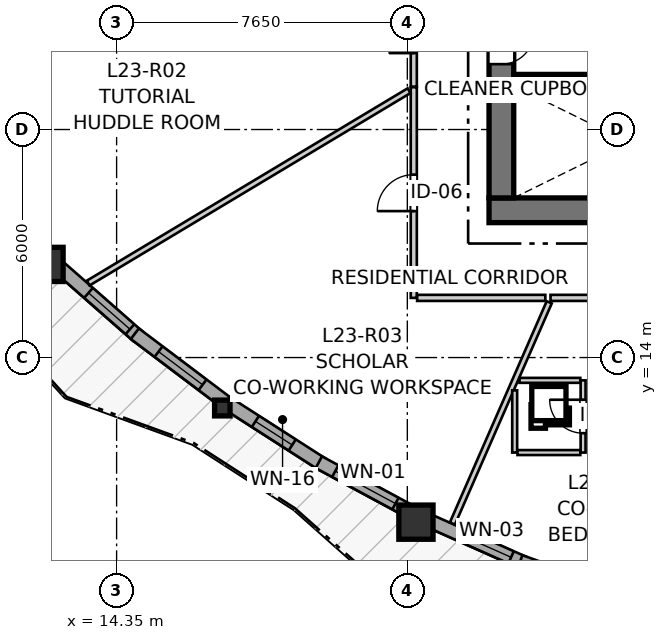
"""IFC4 building model, lengths in metres.
Left out: names, types, materials, properties, quantities, classifications, styles, units other than length and angle.
Written with IfcOpenShell. Run it as: python <this file> out.ifc"""

import sys

from ifc_helpers import new_model, si_unit, direction, frame, frame_2d, origin, origin_2d, place, context, subcontext, project, spatial, rectangle, i_section, extrude, source, transform, mapped, element, fill, save


model = new_model("IFC4")
c1 = context("Model", 3, precision=1e-05, world=origin(), true_north=direction((0.0, 1.0)))
c2 = subcontext(c1, "Body", "Model", "MODEL_VIEW")
j1 = project(units=[si_unit("LENGTHUNIT", "METRE"), si_unit("PLANEANGLEUNIT", "RADIAN")], contexts=[c1])
p1 = place(None, origin())
s1 = spatial("IfcSite", under=j1, at=p1, CompositionType="ELEMENT")
p2 = place(p1, origin())
s2 = spatial("IfcBuilding", under=s1, at=p2, CompositionType="ELEMENT")
p3 = place(p2, frame((0.0, 0.0, 80.0)))
s3 = spatial("IfcBuildingStorey", under=s2, at=p3, CompositionType="ELEMENT", Elevation=80.0)
p4 = place(p3, frame((24.15, 17.875, 0.0), z_axis=(0.0, 0.0, 1.0), x_axis=(1.0, 0.0, 0.0)))
e1 = element("IfcWall", 1, at=p4, inside=s3, PredefinedType="SHEAR", context=c2, shape_type="SweptSolid", body=[
    extrude(rectangle(XDim=12.4, YDim=0.65, at=frame_2d((6.2, 0.0))), origin(), (0.0, 0.0, 1.0), 2.935),
])
p5 = place(p3, frame((24.475, 33.8, 0.0), z_axis=(0.0, 0.0, 1.0), x_axis=(0.0, -1.0, 0.0)))
e2 = element("IfcWall", 2, at=p5, inside=s3, PredefinedType="SHEAR", context=c2, shape_type="SweptSolid", body=[
    extrude(rectangle(XDim=15.6, YDim=0.65, at=frame_2d((7.8, 0.0))), origin(), (0.0, 0.0, 1.0), 2.935),
])
p6 = place(p5, frame((7.05, 0.0, 0.0)))
e3 = element("IfcOpeningElement", 3, at=p6, cuts=e2, PredefinedType="OPENING", context=c2, shape_type="SweptSolid", body=[
    extrude(rectangle(XDim=1.5, YDim=2.15, at=frame_2d((0.75, 1.075))), frame((0.0, 0.335, 0.0), z_axis=(0.0, -1.0, 0.0), x_axis=(1.0, 0.0, 0.0)), (0.0, 0.0, 1.0), 0.67),
])
p7 = place(p5, frame((3.52, 0.0, 0.0)))
e4 = element("IfcOpeningElement", 4, at=p7, cuts=e2, PredefinedType="OPENING", context=c2, shape_type="SweptSolid", body=[
    extrude(rectangle(XDim=0.86, YDim=2.05, at=frame_2d((0.43, 1.025))), frame((0.0, 0.335, 0.0), z_axis=(0.0, -1.0, 0.0), x_axis=(1.0, 0.0, 0.0)), (0.0, 0.0, 1.0), 0.67),
])
p8 = place(p5, frame((11.22, 0.0, 0.0)))
e5 = element("IfcOpeningElement", 5, at=p8, cuts=e2, PredefinedType="OPENING", context=c2, shape_type="SweptSolid", body=[
    extrude(rectangle(XDim=0.86, YDim=2.05, at=frame_2d((0.43, 1.025))), frame((0.0, 0.335, 0.0), z_axis=(0.0, -1.0, 0.0), x_axis=(1.0, 0.0, 0.0)), (0.0, 0.0, 1.0), 0.67),
])
p9 = place(p3, frame((24.8, 21.3, 0.0), z_axis=(0.0, 0.0, 1.0), x_axis=(1.0, 0.0, 0.0)))
e6 = element("IfcWall", 6, at=p9, inside=s3, PredefinedType="SHEAR", context=c2, shape_type="SweptSolid", body=[
    extrude(rectangle(XDim=11.1, YDim=0.3, at=frame_2d((5.55, 0.0))), origin(), (0.0, 0.0, 1.0), 2.935),
])
p10 = place(p9, frame((6.22, 0.0, 0.0)))
e7 = element("IfcOpeningElement", 7, at=p10, cuts=e6, PredefinedType="OPENING", context=c2, shape_type="SweptSolid", body=[
    extrude(rectangle(XDim=0.98, YDim=2.15, at=frame_2d((0.49, 1.075))), frame((0.0, 0.16, 0.0), z_axis=(0.0, -1.0, 0.0), x_axis=(1.0, 0.0, 0.0)), (0.0, 0.0, 1.0), 0.32),
])
p11 = place(p9, frame((9.15, 0.0, 0.0)))
e8 = element("IfcOpeningElement", 8, at=p11, cuts=e6, PredefinedType="OPENING", context=c2, shape_type="SweptSolid", body=[
    extrude(rectangle(XDim=1.15, YDim=2.15, at=frame_2d((0.575, 1.075))), frame((0.0, 0.16, 0.0), z_axis=(0.0, -1.0, 0.0), x_axis=(1.0, 0.0, 0.0)), (0.0, 0.0, 1.0), 0.32),
])
m1 = source(origin(), c2, "Body", "SweptSolid", [
    extrude(rectangle(XDim=0.9, YDim=0.9, at=origin_2d()), origin(), (0.0, 0.0, 1.0), 2.935),
])
p12 = place(p3, frame((12.493, 16.451, 0.0), z_axis=(0.0, 0.0, 1.0), x_axis=(1.0, 0.0, 0.0)))
e9 = element("IfcColumn", 9, at=p12, inside=s3, PredefinedType="COLUMN", context=c2, shape_type="MappedRepresentation", body=[
    mapped(m1, transform((0.0, 0.0, 0.0), x_axis=(1.0, 0.0, 0.0), y_axis=(0.0, 1.0, 0.0), z_axis=(0.0, 0.0, 1.0), scale=1.0)),
])
m2 = source(origin(), c2, "Body", "SweptSolid", [
    extrude(i_section(OverallWidth=0.406, OverallDepth=0.416, WebThickness=0.027, FlangeThickness=0.044, FilletRadius=0.015, at=origin_2d()), origin(), (0.0, 0.0, 1.0), 2.935),
])
p13 = place(p3, frame((17.131, 12.673, 0.0), z_axis=(0.0, 0.0, 1.0), x_axis=(1.0, 0.0, 0.0)))
e10 = element("IfcColumn", 10, at=p13, inside=s3, PredefinedType="PILASTER", context=c2, shape_type="MappedRepresentation", body=[
    mapped(m2, transform((0.0, 0.0, 0.0), x_axis=(1.0, 0.0, 0.0), y_axis=(0.0, 1.0, 0.0), z_axis=(0.0, 0.0, 1.0), scale=1.0)),
])
p14 = place(p3, frame((22.227, 9.669, 0.0), z_axis=(0.0, 0.0, 1.0), x_axis=(1.0, 0.0, 0.0)))
e11 = element("IfcColumn", 11, at=p14, inside=s3, PredefinedType="COLUMN", context=c2, shape_type="MappedRepresentation", body=[
    mapped(m1, transform((0.0, 0.0, 0.0), x_axis=(1.0, 0.0, 0.0), y_axis=(0.0, 1.0, 0.0), z_axis=(0.0, 0.0, 1.0), scale=1.0)),
])
p15 = place(p3, frame((12.777, 16.434, 0.0), z_axis=(0.0, 0.0, 1.0), x_axis=(0.751531192513, -0.659697556976, 0.0)))
e12 = element("IfcWall", 12, at=p15, inside=s3, PredefinedType="SOLIDWALL", context=c2, shape_type="SweptSolid", body=[
    extrude(rectangle(XDim=2.823, YDim=0.35, at=frame_2d((1.412, 0.0))), origin(), (0.0, 0.0, 1.0), 2.465),
])
p16 = place(p15, frame((1.11, 0.0, 0.82)))
e13 = element("IfcOpeningElement", 13, at=p16, cuts=e12, PredefinedType="OPENING", context=c2, shape_type="SweptSolid", body=[
    extrude(rectangle(XDim=1.45, YDim=1.25, at=frame_2d((0.725, 0.625))), frame((0.0, 0.185, 0.0), z_axis=(0.0, -1.0, 0.0), x_axis=(1.0, 0.0, 0.0)), (0.0, 0.0, 1.0), 0.37),
])
p17 = place(p3, frame((14.83, 14.627, 0.0), z_axis=(0.0, 0.0, 1.0), x_axis=(0.798382892471, -0.602150111691, 0.0)))
e14 = element("IfcWall", 14, at=p17, inside=s3, PredefinedType="SOLIDWALL", context=c2, shape_type="SweptSolid", body=[
    extrude(rectangle(XDim=2.995, YDim=0.35, at=frame_2d((1.497, 0.0))), origin(), (0.0, 0.0, 1.0), 2.465),
])
p18 = place(p17, frame((0.782, 0.0, 0.82)))
e15 = element("IfcOpeningElement", 15, at=p18, cuts=e14, PredefinedType="OPENING", context=c2, shape_type="SweptSolid", body=[
    extrude(rectangle(XDim=1.45, YDim=1.25, at=frame_2d((0.725, 0.625))), frame((0.0, 0.185, 0.0), z_axis=(0.0, -1.0, 0.0), x_axis=(1.0, 0.0, 0.0)), (0.0, 0.0, 1.0), 0.37),
])
p19 = place(p3, frame((17.243, 12.809, 0.0), z_axis=(0.0, 0.0, 1.0), x_axis=(0.84150067635, -0.540256061236, 0.0)))
e16 = element("IfcWall", 16, at=p19, inside=s3, PredefinedType="SOLIDWALL", context=c2, shape_type="SweptSolid", body=[
    extrude(rectangle(XDim=2.978, YDim=0.35, at=frame_2d((1.489, 0.0))), origin(), (0.0, 0.0, 1.0), 2.465),
])
p20 = place(p19, frame((0.904, 0.0, 0.82)))
e17 = element("IfcOpeningElement", 17, at=p20, cuts=e16, PredefinedType="OPENING", context=c2, shape_type="SweptSolid", body=[
    extrude(rectangle(XDim=1.15, YDim=1.2, at=frame_2d((0.575, 0.6))), frame((0.0, 0.185, 0.0), z_axis=(0.0, -1.0, 0.0), x_axis=(1.0, 0.0, 0.0)), (0.0, 0.0, 1.0), 0.37),
])
p21 = place(p3, frame((19.671, 11.246, 0.0), z_axis=(0.0, 0.0, 1.0), x_axis=(0.880120285763, -0.474750758387, 0.0)))
e18 = element("IfcWall", 18, at=p21, inside=s3, PredefinedType="SOLIDWALL", context=c2, shape_type="SweptSolid", body=[
    extrude(rectangle(XDim=2.773, YDim=0.35, at=frame_2d((1.386, 0.0))), origin(), (0.0, 0.0, 1.0), 2.465),
])
p22 = place(p21, frame((0.491, 0.0, 0.82)))
e19 = element("IfcOpeningElement", 19, at=p22, cuts=e18, PredefinedType="OPENING", context=c2, shape_type="SweptSolid", body=[
    extrude(rectangle(XDim=1.8, YDim=1.45, at=frame_2d((0.9, 0.725))), frame((0.0, 0.185, 0.0), z_axis=(0.0, -1.0, 0.0), x_axis=(1.0, 0.0, 0.0)), (0.0, 0.0, 1.0), 0.37),
])
p23 = place(p3, frame((22.503, 9.737, 0.0), z_axis=(0.0, 0.0, 1.0), x_axis=(0.913443049169, -0.406966578388, 0.0)))
e20 = element("IfcWall", 20, at=p23, inside=s3, PredefinedType="SOLIDWALL", context=c2, shape_type="SweptSolid", body=[
    extrude(rectangle(XDim=2.79, YDim=0.35, at=frame_2d((1.395, 0.0))), origin(), (0.0, 0.0, 1.0), 2.465),
])
p24 = place(p23, frame((0.938, 0.0, 0.82)))
e21 = element("IfcOpeningElement", 21, at=p24, cuts=e20, PredefinedType="OPENING", context=c2, shape_type="SweptSolid", body=[
    extrude(rectangle(XDim=1.5, YDim=1.45, at=frame_2d((0.75, 0.725))), frame((0.0, 0.185, 0.0), z_axis=(0.0, -1.0, 0.0), x_axis=(1.0, 0.0, 0.0)), (0.0, 0.0, 1.0), 0.37),
])
p25 = place(p3, frame((24.969, 8.635, 0.0), z_axis=(0.0, 0.0, 1.0), x_axis=(0.941099972293, -0.338128440315, 0.0)))
e22 = element("IfcWall", 22, at=p25, inside=s3, PredefinedType="SOLIDWALL", context=c2, shape_type="SweptSolid", body=[
    extrude(rectangle(XDim=3.028, YDim=0.35, at=frame_2d((1.514, 0.0))), origin(), (0.0, 0.0, 1.0), 2.465),
])
p26 = place(p25, frame((0.774, 0.0, 0.82)))
e23 = element("IfcOpeningElement", 23, at=p26, cuts=e22, PredefinedType="OPENING", context=c2, shape_type="SweptSolid", body=[
    extrude(rectangle(XDim=1.5, YDim=1.45, at=frame_2d((0.75, 0.725))), frame((0.0, 0.185, 0.0), z_axis=(0.0, -1.0, 0.0), x_axis=(1.0, 0.0, 0.0)), (0.0, 0.0, 1.0), 0.37),
])
p27 = place(p3, frame((22.17, 15.57, 0.0), z_axis=(0.0, 0.0, 1.0), x_axis=(0.0, 1.0, 0.0)))
e24 = element("IfcWall", 24, at=p27, inside=s3, PredefinedType="PARTITIONING", context=c2, shape_type="SweptSolid", body=[
    extrude(rectangle(XDim=5.543, YDim=0.16, at=frame_2d((2.771, 0.0))), origin(), (0.0, 0.0, 1.0), 2.935),
])
p28 = place(p27, frame((2.283, 0.0, 0.0)))
e25 = element("IfcOpeningElement", 25, at=p28, cuts=e24, PredefinedType="OPENING", context=c2, shape_type="SweptSolid", body=[
    extrude(rectangle(XDim=0.96, YDim=2.1, at=frame_2d((0.48, 1.05))), frame((0.0, 0.09, 0.0), z_axis=(0.0, -1.0, 0.0), x_axis=(1.0, 0.0, 0.0)), (0.0, 0.0, 1.0), 0.18),
])
p29 = place(p3, frame((29.438, 15.57, 0.0), z_axis=(0.0, 0.0, 1.0), x_axis=(-1.0, 0.0, 0.0)))
e26 = element("IfcWall", 26, at=p29, inside=s3, PredefinedType="PARTITIONING", context=c2, shape_type="SweptSolid", body=[
    extrude(rectangle(XDim=3.67, YDim=0.16, at=frame_2d((1.835, 0.0))), origin(), (0.0, 0.0, 1.0), 2.935),
])
p30 = place(p29, frame((1.374, 0.0, 0.0)))
e27 = element("IfcOpeningElement", 27, at=p30, cuts=e26, PredefinedType="OPENING", context=c2, shape_type="SweptSolid", body=[
    extrude(rectangle(XDim=0.92, YDim=2.1, at=frame_2d((0.46, 1.05))), frame((0.0, 0.09, 0.0), z_axis=(0.0, -1.0, 0.0), x_axis=(1.0, 0.0, 0.0)), (0.0, 0.0, 1.0), 0.18),
])
p31 = place(p3, frame((22.17, 21.128, 0.0), z_axis=(0.0, 0.0, 1.0), x_axis=(0.0, 1.0, 0.0)))
e28 = element("IfcWall", 28, at=p31, inside=s3, PredefinedType="PARTITIONING", context=c2, shape_type="SweptSolid", body=[
    extrude(rectangle(XDim=3.022, YDim=0.16, at=frame_2d((1.511, 0.0))), origin(), (0.0, 0.0, 1.0), 2.935),
])
p32 = place(p31, frame((0.883, 0.0, 0.0)))
e29 = element("IfcOpeningElement", 29, at=p32, cuts=e28, PredefinedType="OPENING", context=c2, shape_type="SweptSolid", body=[
    extrude(rectangle(XDim=1.3, YDim=2.1, at=frame_2d((0.65, 1.05))), frame((0.0, 0.09, 0.0), z_axis=(0.0, -1.0, 0.0), x_axis=(1.0, 0.0, 0.0)), (0.0, 0.0, 1.0), 0.18),
])
p33 = place(p3, frame((26.625, 11.5, 0.0), z_axis=(0.0, 0.0, 1.0), x_axis=(0.0, 1.0, 0.0)))
e30 = element("IfcWall", 30, at=p33, inside=s3, PredefinedType="PARTITIONING", context=c2, shape_type="SweptSolid", body=[
    extrude(rectangle(XDim=1.9, YDim=0.13, at=frame_2d((0.95, 0.0))), origin(), (0.0, 0.0, 1.0), 2.935),
])
p34 = place(p33, frame((0.51, 0.0, 0.0)))
e31 = element("IfcOpeningElement", 31, at=p34, cuts=e30, PredefinedType="OPENING", context=c2, shape_type="SweptSolid", body=[
    extrude(rectangle(XDim=0.88, YDim=2.05, at=frame_2d((0.44, 1.025))), frame((0.0, 0.075, 0.0), z_axis=(0.0, -1.0, 0.0), x_axis=(1.0, 0.0, 0.0)), (0.0, 0.0, 1.0), 0.15),
])
p35 = place(p3, frame((13.601, 15.958, 0.0), z_axis=(0.0, 0.0, 1.0), x_axis=(0.857661345212, 0.514214952066, 0.0)))
e32 = element("IfcWall", 32, at=p35, inside=s3, PredefinedType="PARTITIONING", context=c2, shape_type="SweptSolid", body=[
    extrude(rectangle(XDim=9.846, YDim=0.145, at=frame_2d((4.923, 0.0))), origin(), (0.0, 0.0, 1.0), 2.935),
])
p36 = place(p3, frame((23.186, 9.634, 0.0), z_axis=(0.0, 0.0, 1.0), x_axis=(0.400994208685, 0.916080588486, 0.0)))
e33 = element("IfcWall", 33, at=p36, inside=s3, PredefinedType="PARTITIONING", context=c2, shape_type="SweptSolid", body=[
    extrude(rectangle(XDim=6.353, YDim=0.145, at=frame_2d((3.177, 0.0))), origin(), (0.0, 0.0, 1.0), 2.935),
])
p37 = place(p3, frame((22.258, 15.57, 0.0), z_axis=(0.0, 0.0, 1.0), x_axis=(1.0, 0.0, 0.0)))
e34 = element("IfcWall", 34, at=p37, inside=s3, PredefinedType="PARTITIONING", context=c2, shape_type="SweptSolid", body=[
    extrude(rectangle(XDim=3.373, YDim=0.16, at=frame_2d((1.687, 0.0))), origin(), (0.0, 0.0, 1.0), 2.935),
])
p38 = place(p3, frame((24.825, 11.5, 0.0), z_axis=(0.0, 0.0, 1.0), x_axis=(0.0, 1.0, 0.0)))
e35 = element("IfcWall", 35, at=p38, inside=s3, PredefinedType="PARTITIONING", context=c2, shape_type="SweptSolid", body=[
    extrude(rectangle(XDim=1.637, YDim=0.13, at=frame_2d((0.818, 0.0))), origin(), (0.0, 0.0, 1.0), 2.935),
])
p39 = place(p3, frame((24.898, 11.5, 0.0), z_axis=(0.0, 0.0, 1.0), x_axis=(1.0, 0.0, 0.0)))
e36 = element("IfcWall", 36, at=p39, inside=s3, PredefinedType="PARTITIONING", context=c2, shape_type="SweptSolid", body=[
    extrude(rectangle(XDim=1.654, YDim=0.13, at=frame_2d((0.827, 0.0))), origin(), (0.0, 0.0, 1.0), 2.543),
])
p40 = place(p3, frame((24.951, 13.4, 0.0), z_axis=(0.0, 0.0, 1.0), x_axis=(1.0, 0.0, 0.0)))
e37 = element("IfcWall", 37, at=p40, inside=s3, PredefinedType="PARTITIONING", context=c2, shape_type="SweptSolid", body=[
    extrude(rectangle(XDim=1.601, YDim=0.13, at=frame_2d((0.801, 0.0))), origin(), (0.0, 0.0, 1.0), 2.935),
])
m3 = source(origin(), c2, "Body", "SweptSolid", [
    extrude(rectangle(XDim=1.45, YDim=1.25, at=frame_2d((0.725, 0.625))), frame((0.0, 0.03, 0.0), z_axis=(0.0, -1.0, 0.0), x_axis=(1.0, 0.0, 0.0)), (0.0, 0.0, 1.0), 0.06),
])
p41 = place(p16, origin())
e38 = element("IfcWindow", 38, at=p41, inside=s3, PartitioningType="SINGLE_PANEL", PredefinedType="WINDOW", context=c2, shape_type="MappedRepresentation", body=[
    mapped(m3, transform((0.0, 0.0, 0.0), x_axis=(1.0, 0.0, 0.0), y_axis=(0.0, 1.0, 0.0), z_axis=(0.0, 0.0, 1.0), scale=1.0)),
])
fill(e13, e38)
p42 = place(p18, origin())
e39 = element("IfcWindow", 39, at=p42, inside=s3, PartitioningType="SINGLE_PANEL", PredefinedType="WINDOW", context=c2, shape_type="MappedRepresentation", body=[
    mapped(m3, transform((0.0, 0.0, 0.0), x_axis=(1.0, 0.0, 0.0), y_axis=(0.0, 1.0, 0.0), z_axis=(0.0, 0.0, 1.0), scale=1.0)),
])
fill(e15, e39)
m4 = source(origin(), c2, "Body", "SweptSolid", [
    extrude(rectangle(XDim=1.15, YDim=1.2, at=frame_2d((0.575, 0.6))), frame((0.0, 0.03, 0.0), z_axis=(0.0, -1.0, 0.0), x_axis=(1.0, 0.0, 0.0)), (0.0, 0.0, 1.0), 0.06),
])
p43 = place(p20, origin())
e40 = element("IfcWindow", 40, at=p43, inside=s3, PartitioningType="SINGLE_PANEL", PredefinedType="WINDOW", context=c2, shape_type="MappedRepresentation", body=[
    mapped(m4, transform((0.0, 0.0, 0.0), x_axis=(1.0, 0.0, 0.0), y_axis=(0.0, 1.0, 0.0), z_axis=(0.0, 0.0, 1.0), scale=1.0)),
])
fill(e17, e40)
m5 = source(origin(), c2, "Body", "SweptSolid", [
    extrude(rectangle(XDim=1.8, YDim=1.45, at=frame_2d((0.9, 0.725))), frame((0.0, 0.03, 0.0), z_axis=(0.0, -1.0, 0.0), x_axis=(1.0, 0.0, 0.0)), (0.0, 0.0, 1.0), 0.06),
])
p44 = place(p22, origin())
e41 = element("IfcWindow", 41, at=p44, inside=s3, PartitioningType="SINGLE_PANEL", PredefinedType="WINDOW", context=c2, shape_type="MappedRepresentation", body=[
    mapped(m5, transform((0.0, 0.0, 0.0), x_axis=(1.0, 0.0, 0.0), y_axis=(0.0, 1.0, 0.0), z_axis=(0.0, 0.0, 1.0), scale=1.0)),
])
fill(e19, e41)
m6 = source(origin(), c2, "Body", "SweptSolid", [
    extrude(rectangle(XDim=1.5, YDim=1.45, at=frame_2d((0.75, 0.725))), frame((0.0, 0.03, 0.0), z_axis=(0.0, -1.0, 0.0), x_axis=(1.0, 0.0, 0.0)), (0.0, 0.0, 1.0), 0.06),
])
p45 = place(p24, origin())
e42 = element("IfcWindow", 42, at=p45, inside=s3, PartitioningType="SINGLE_PANEL", PredefinedType="WINDOW", context=c2, shape_type="MappedRepresentation", body=[
    mapped(m6, transform((0.0, 0.0, 0.0), x_axis=(1.0, 0.0, 0.0), y_axis=(0.0, 1.0, 0.0), z_axis=(0.0, 0.0, 1.0), scale=1.0)),
])
fill(e21, e42)
m7 = source(origin(), c2, "Body", "SweptSolid", [
    extrude(rectangle(XDim=0.86, YDim=2.05, at=frame_2d((0.43, 1.025))), frame((0.0, 0.025, 0.0), z_axis=(0.0, -1.0, 0.0), x_axis=(1.0, 0.0, 0.0)), (0.0, 0.0, 1.0), 0.05),
])
p46 = place(p8, origin())
e43 = element("IfcDoor", 43, at=p46, inside=s3, OperationType="SINGLE_SWING_LEFT", PredefinedType="DOOR", context=c2, shape_type="MappedRepresentation", body=[
    mapped(m7, transform((0.0, 0.0, 0.0), x_axis=(1.0, 0.0, 0.0), y_axis=(0.0, 1.0, 0.0), z_axis=(0.0, 0.0, 1.0), scale=1.0)),
])
fill(e5, e43)
m8 = source(origin(), c2, "Body", "SweptSolid", [
    extrude(rectangle(XDim=0.96, YDim=2.1, at=frame_2d((0.48, 1.05))), frame((0.0, 0.025, 0.0), z_axis=(0.0, -1.0, 0.0), x_axis=(1.0, 0.0, 0.0)), (0.0, 0.0, 1.0), 0.05),
])
p47 = place(p28, origin())
e44 = element("IfcDoor", 44, at=p47, inside=s3, OperationType="SINGLE_SWING_LEFT", PredefinedType="DOOR", context=c2, shape_type="MappedRepresentation", body=[
    mapped(m8, transform((0.0, 0.0, 0.0), x_axis=(1.0, 0.0, 0.0), y_axis=(0.0, 1.0, 0.0), z_axis=(0.0, 0.0, 1.0), scale=1.0)),
])
fill(e25, e44)
m9 = source(origin(), c2, "Body", "SweptSolid", [
    extrude(rectangle(XDim=1.3, YDim=2.1, at=frame_2d((0.65, 1.05))), frame((0.0, 0.025, 0.0), z_axis=(0.0, -1.0, 0.0), x_axis=(1.0, 0.0, 0.0)), (0.0, 0.0, 1.0), 0.05),
])
p48 = place(p32, origin())
e45 = element("IfcDoor", 45, at=p48, inside=s3, OperationType="DOUBLE_DOOR_SINGLE_SWING", PredefinedType="DOOR", context=c2, shape_type="MappedRepresentation", body=[
    mapped(m9, transform((0.0, 0.0, 0.0), x_axis=(1.0, 0.0, 0.0), y_axis=(0.0, 1.0, 0.0), z_axis=(0.0, 0.0, 1.0), scale=1.0)),
])
fill(e29, e45)
m10 = source(origin(), c2, "Body", "SweptSolid", [
    extrude(rectangle(XDim=0.88, YDim=2.05, at=frame_2d((0.44, 1.025))), frame((0.0, 0.025, 0.0), z_axis=(0.0, -1.0, 0.0), x_axis=(1.0, 0.0, 0.0)), (0.0, 0.0, 1.0), 0.05),
])
p49 = place(p34, origin())
e46 = element("IfcDoor", 46, at=p49, inside=s3, OperationType="SINGLE_SWING_RIGHT", PredefinedType="DOOR", context=c2, shape_type="MappedRepresentation", body=[
    mapped(m10, transform((0.0, 0.0, 0.0), x_axis=(1.0, 0.0, 0.0), y_axis=(0.0, 1.0, 0.0), z_axis=(0.0, 0.0, 1.0), scale=1.0)),
])
fill(e31, e46)
save(model, sys.argv[1])
